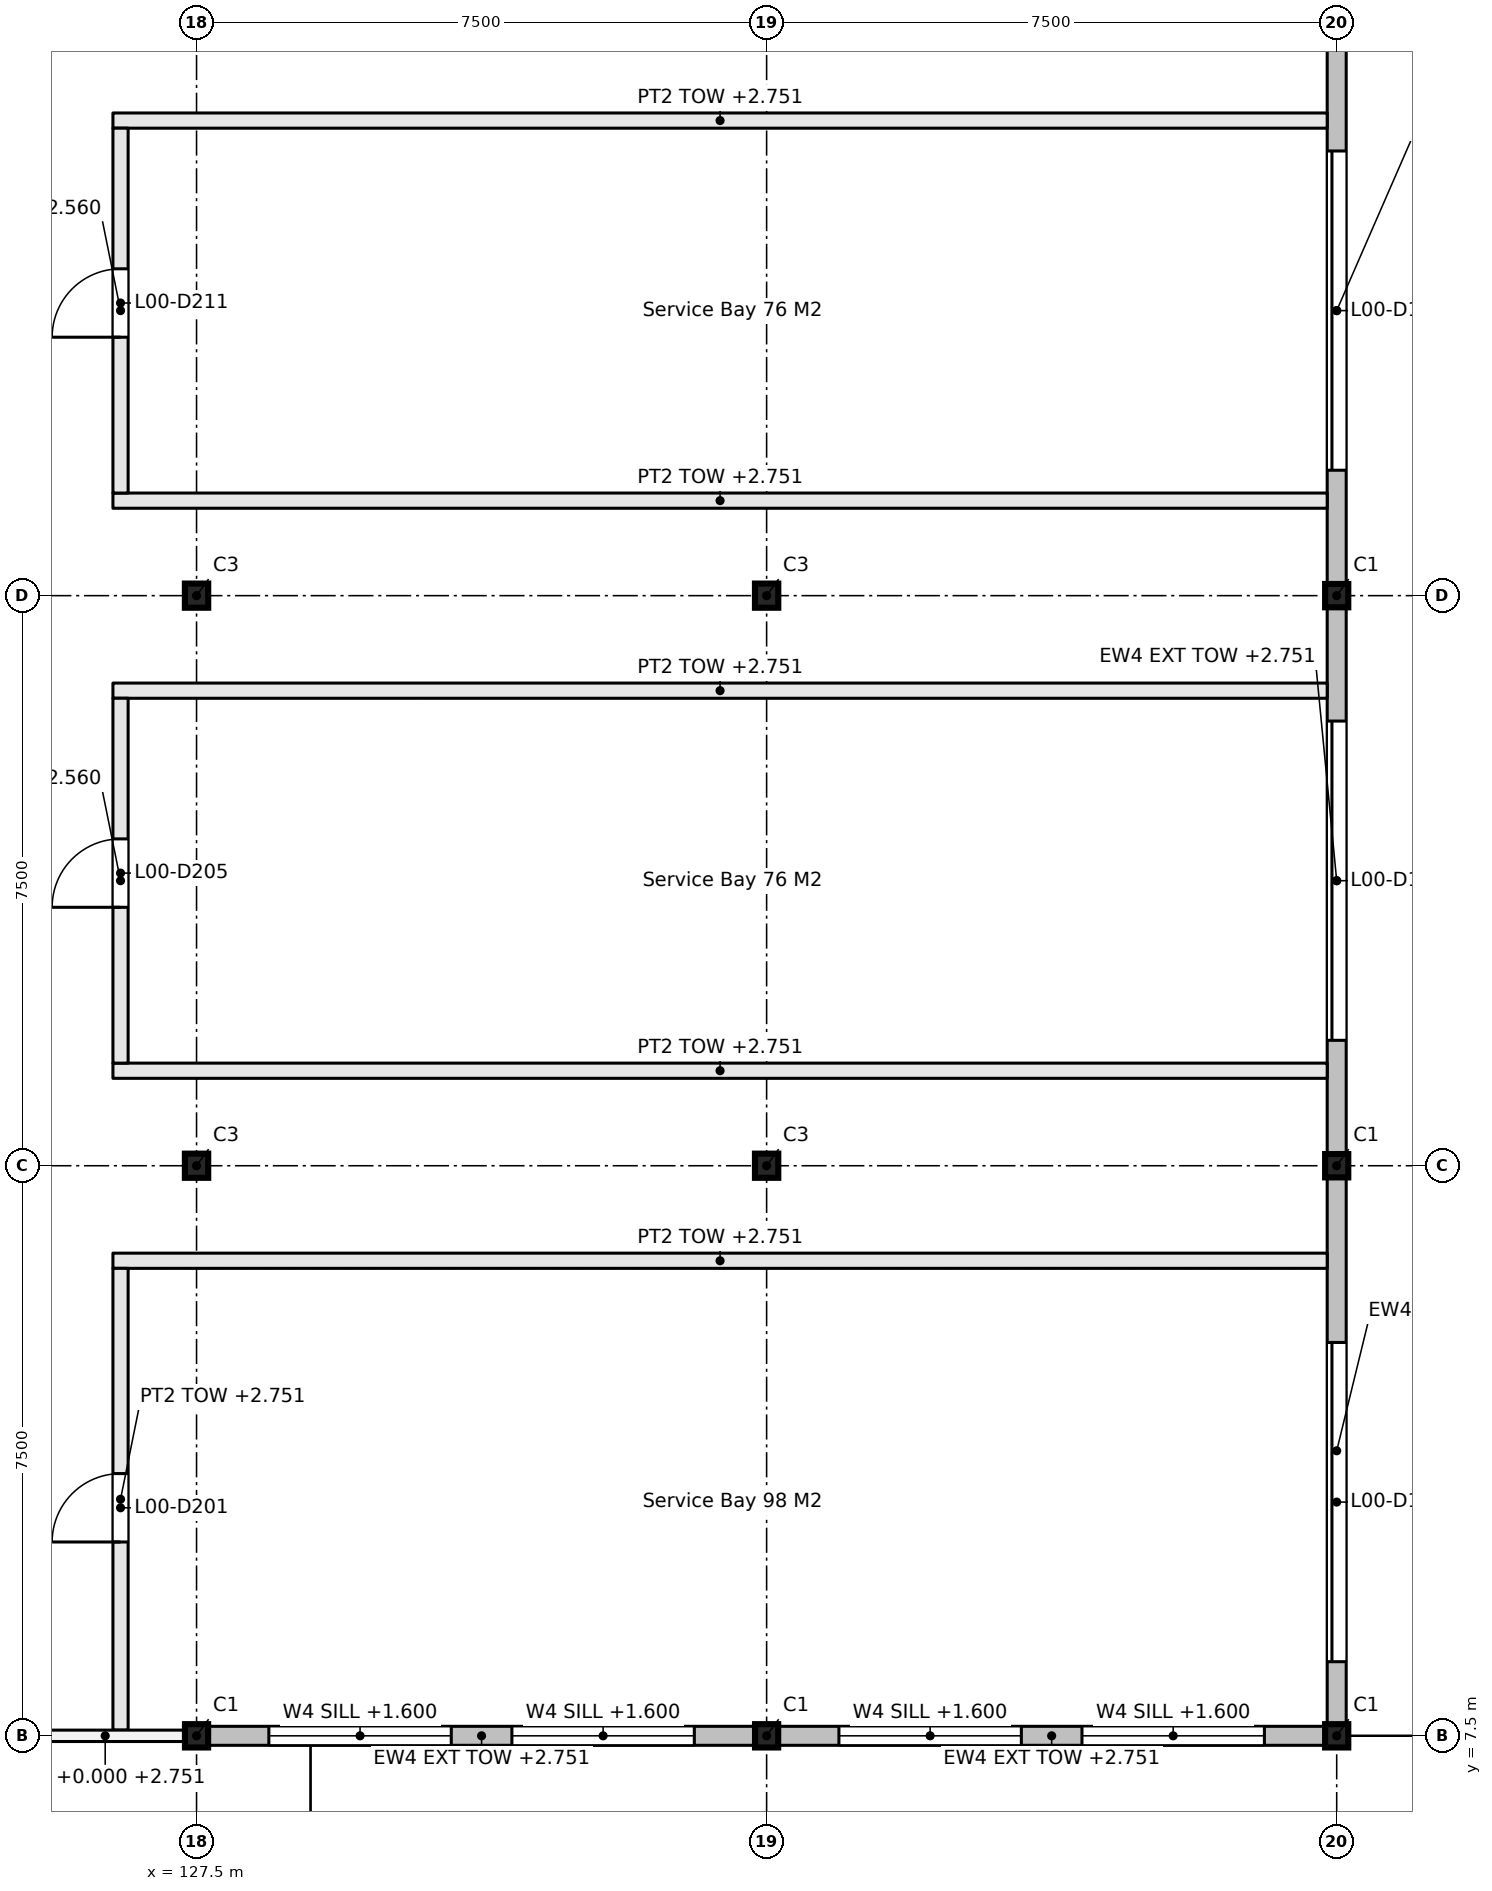
"""IFC4 building model, lengths in metres.
Left out: names, types, materials, properties, quantities, classifications, styles, units other than length and angle.
Written with IfcOpenShell. Run it as: python <this file> out.ifc"""

import sys

from ifc_helpers import new_model, si_unit, direction, frame, frame_2d, origin, origin_2d, place, context, subcontext, project, spatial, rectangle, i_section, extrude, element, fill, save


model = new_model("IFC4")
c1 = context("Model", 3, precision=1e-05, world=origin(), true_north=direction((0.0, 1.0)))
c2 = subcontext(c1, "Body", "Model", "MODEL_VIEW")
j1 = project(units=[si_unit("LENGTHUNIT", "METRE"), si_unit("PLANEANGLEUNIT", "RADIAN")], contexts=[c1])
p1 = place(None, origin())
s1 = spatial("IfcSite", under=j1, at=p1, CompositionType="ELEMENT")
p2 = place(p1, origin())
s2 = spatial("IfcBuilding", under=s1, at=p2, CompositionType="ELEMENT")
p3 = place(p2, origin())
s3 = spatial("IfcBuildingStorey", under=s2, at=p3, CompositionType="ELEMENT", Elevation=0.0)
p4 = place(p3, frame((127.5, 7.5, -0.25), z_axis=(0.0, 0.0, 1.0), x_axis=(1.0, 0.0, 0.0)))
e1 = element("IfcColumn", 1, at=p4, inside=s3, PredefinedType="COLUMN", context=c2, shape_type="SweptSolid", body=[
    extrude(i_section(OverallWidth=0.305, OverallDepth=0.307, WebThickness=0.01, FlangeThickness=0.015, FilletRadius=0.015, at=origin_2d()), origin(), (0.0, 0.0, 1.0), 3.55),
])
for number, where, z_axis, x_axis in (
    (2, (127.5, 15.0, -0.25), (0.0, 0.0, 1.0), (1.0, 0.0, 0.0)),
    (3, (127.5, 22.5, -0.25), (0.0, 0.0, 1.0), (1.0, 0.0, 0.0)),
):
    element("IfcColumn", number, at=place(p3, frame(where, z_axis=z_axis, x_axis=x_axis)), inside=s3, PredefinedType="COLUMN", context=c2, shape_type="SweptSolid", body=[
        extrude(i_section(OverallWidth=0.307, OverallDepth=0.318, WebThickness=0.013, FlangeThickness=0.021, FilletRadius=0.015, at=origin_2d()), origin(), (0.0, 0.0, 1.0), 3.55),
    ])
p5 = place(p3, frame((135.0, 7.5, -0.25), z_axis=(0.0, 0.0, 1.0), x_axis=(1.0, 0.0, 0.0)))
e4 = element("IfcColumn", 4, at=p5, inside=s3, PredefinedType="COLUMN", context=c2, shape_type="SweptSolid", body=[
    extrude(i_section(OverallWidth=0.305, OverallDepth=0.307, WebThickness=0.01, FlangeThickness=0.015, FilletRadius=0.015, at=origin_2d()), origin(), (0.0, 0.0, 1.0), 3.55),
])
for number, where, z_axis, x_axis in (
    (5, (135.0, 15.0, -0.25), (0.0, 0.0, 1.0), (1.0, 0.0, 0.0)),
    (6, (135.0, 22.5, -0.25), (0.0, 0.0, 1.0), (1.0, 0.0, 0.0)),
):
    element("IfcColumn", number, at=place(p3, frame(where, z_axis=z_axis, x_axis=x_axis)), inside=s3, PredefinedType="COLUMN", context=c2, shape_type="SweptSolid", body=[
        extrude(i_section(OverallWidth=0.307, OverallDepth=0.318, WebThickness=0.013, FlangeThickness=0.021, FilletRadius=0.015, at=origin_2d()), origin(), (0.0, 0.0, 1.0), 3.55),
    ])
for number, where, z_axis, x_axis in (
    (7, (142.5, 7.5, -0.25), (0.0, 0.0, 1.0), (1.0, 0.0, 0.0)),
    (8, (142.5, 15.0, -0.25), (0.0, 0.0, 1.0), (1.0, 0.0, 0.0)),
    (9, (142.5, 22.5, -0.25), (0.0, 0.0, 1.0), (1.0, 0.0, 0.0)),
):
    element("IfcColumn", number, at=place(p3, frame(where, z_axis=z_axis, x_axis=x_axis)), inside=s3, PredefinedType="COLUMN", context=c2, shape_type="SweptSolid", body=[
        extrude(i_section(OverallWidth=0.305, OverallDepth=0.307, WebThickness=0.01, FlangeThickness=0.015, FilletRadius=0.015, at=origin_2d()), origin(), (0.0, 0.0, 1.0), 3.55),
    ])
for number, where, z_axis, x_axis in (
    (10, (126.4, 13.75, 0.0), (0.0, 0.0, 1.0), (1.0, 0.0, 0.0)),
    (11, (126.4, 16.25, 0.0), (0.0, 0.0, 1.0), (1.0, 0.0, 0.0)),
    (12, (126.4, 21.25, 0.0), (0.0, 0.0, 1.0), (1.0, 0.0, 0.0)),
    (13, (126.4, 23.75, 0.0), (0.0, 0.0, 1.0), (1.0, 0.0, 0.0)),
    (14, (126.4, 28.75, 0.0), (0.0, 0.0, 1.0), (1.0, 0.0, 0.0)),
):
    element("IfcWall", number, at=place(p3, frame(where, z_axis=z_axis, x_axis=x_axis)), inside=s3, PredefinedType="PARTITIONING", context=c2, shape_type="SweptSolid", body=[
        extrude(rectangle(XDim=15.975, YDim=0.2, at=frame_2d((7.988, 0.0))), origin(), (0.0, 0.0, 1.0), 2.751),
    ])
p6 = place(p3, frame((126.5, 7.575, 0.0), z_axis=(0.0, 0.0, 1.0), x_axis=(0.0, 1.0, 0.0)))
e15 = element("IfcWall", 15, at=p6, inside=s3, PredefinedType="PARTITIONING", context=c2, shape_type="SweptSolid", body=[
    extrude(rectangle(XDim=6.075, YDim=0.2, at=frame_2d((3.038, 0.0))), origin(), (0.0, 0.0, 1.0), 2.751),
])
p7 = place(p6, frame((2.475, 0.0, 0.0)))
e16 = element("IfcOpeningElement", 16, at=p7, cuts=e15, PredefinedType="OPENING", context=c2, shape_type="SweptSolid", body=[
    extrude(rectangle(XDim=0.9, YDim=2.1, at=frame_2d((0.45, 1.05))), frame((0.0, 0.11, 0.0), z_axis=(0.0, -1.0, 0.0), x_axis=(1.0, 0.0, 0.0)), (0.0, 0.0, 1.0), 0.22),
])
p8 = place(p3, frame((126.5, 16.35, 0.0), z_axis=(0.0, 0.0, 1.0), x_axis=(0.0, 1.0, 0.0)))
e17 = element("IfcWall", 17, at=p8, inside=s3, PredefinedType="PARTITIONING", context=c2, shape_type="SweptSolid", body=[
    extrude(rectangle(XDim=4.8, YDim=0.2, at=frame_2d((2.4, 0.0))), origin(), (0.0, 0.0, 1.0), 2.56),
])
p9 = place(p8, frame((2.05, 0.0, 0.0)))
e18 = element("IfcOpeningElement", 18, at=p9, cuts=e17, PredefinedType="OPENING", context=c2, shape_type="SweptSolid", body=[
    extrude(rectangle(XDim=0.9, YDim=2.1, at=frame_2d((0.45, 1.05))), frame((0.0, 0.11, 0.0), z_axis=(0.0, -1.0, 0.0), x_axis=(1.0, 0.0, 0.0)), (0.0, 0.0, 1.0), 0.22),
])
p10 = place(p3, frame((126.5, 23.85, 0.0), z_axis=(0.0, 0.0, 1.0), x_axis=(0.0, 1.0, 0.0)))
e19 = element("IfcWall", 19, at=p10, inside=s3, PredefinedType="PARTITIONING", context=c2, shape_type="SweptSolid", body=[
    extrude(rectangle(XDim=4.8, YDim=0.2, at=frame_2d((2.4, 0.0))), origin(), (0.0, 0.0, 1.0), 2.56),
])
p11 = place(p10, frame((2.05, 0.0, 0.0)))
e20 = element("IfcOpeningElement", 20, at=p11, cuts=e19, PredefinedType="OPENING", context=c2, shape_type="SweptSolid", body=[
    extrude(rectangle(XDim=0.9, YDim=2.1, at=frame_2d((0.45, 1.05))), frame((0.0, 0.11, 0.0), z_axis=(0.0, -1.0, 0.0), x_axis=(1.0, 0.0, 0.0)), (0.0, 0.0, 1.0), 0.22),
])
p12 = place(p3, frame((127.654, 7.5, 0.0), z_axis=(0.0, 0.0, 1.0), x_axis=(1.0, 0.0, 0.0)))
e21 = element("IfcWall", 21, at=p12, inside=s3, PredefinedType="SOLIDWALL", context=c2, shape_type="SweptSolid", body=[
    extrude(rectangle(XDim=7.193, YDim=0.25, at=frame_2d((3.596, 0.0))), origin(), (0.0, 0.0, 1.0), 2.751),
])
p13 = place(p12, frame((0.798, 0.0, 1.6)))
e22 = element("IfcOpeningElement", 22, at=p13, cuts=e21, PredefinedType="OPENING", context=c2, shape_type="SweptSolid", body=[
    extrude(rectangle(XDim=2.4, YDim=0.9, at=frame_2d((1.2, 0.45))), frame((0.0, 0.135, 0.0), z_axis=(0.0, -1.0, 0.0), x_axis=(1.0, 0.0, 0.0)), (0.0, 0.0, 1.0), 0.27),
])
p14 = place(p12, frame((3.995, 0.0, 1.6)))
e23 = element("IfcOpeningElement", 23, at=p14, cuts=e21, PredefinedType="OPENING", context=c2, shape_type="SweptSolid", body=[
    extrude(rectangle(XDim=2.4, YDim=0.9, at=frame_2d((1.2, 0.45))), frame((0.0, 0.135, 0.0), z_axis=(0.0, -1.0, 0.0), x_axis=(1.0, 0.0, 0.0)), (0.0, 0.0, 1.0), 0.27),
])
p15 = place(p3, frame((135.154, 7.5, 0.0), z_axis=(0.0, 0.0, 1.0), x_axis=(1.0, 0.0, 0.0)))
e24 = element("IfcWall", 24, at=p15, inside=s3, PredefinedType="SOLIDWALL", context=c2, shape_type="SweptSolid", body=[
    extrude(rectangle(XDim=7.193, YDim=0.25, at=frame_2d((3.596, 0.0))), origin(), (0.0, 0.0, 1.0), 2.751),
])
p16 = place(p15, frame((0.798, 0.0, 1.6)))
e25 = element("IfcOpeningElement", 25, at=p16, cuts=e24, PredefinedType="OPENING", context=c2, shape_type="SweptSolid", body=[
    extrude(rectangle(XDim=2.4, YDim=0.9, at=frame_2d((1.2, 0.45))), frame((0.0, 0.135, 0.0), z_axis=(0.0, -1.0, 0.0), x_axis=(1.0, 0.0, 0.0)), (0.0, 0.0, 1.0), 0.27),
])
p17 = place(p15, frame((3.995, 0.0, 1.6)))
e26 = element("IfcOpeningElement", 26, at=p17, cuts=e24, PredefinedType="OPENING", context=c2, shape_type="SweptSolid", body=[
    extrude(rectangle(XDim=2.4, YDim=0.9, at=frame_2d((1.2, 0.45))), frame((0.0, 0.135, 0.0), z_axis=(0.0, -1.0, 0.0), x_axis=(1.0, 0.0, 0.0)), (0.0, 0.0, 1.0), 0.27),
])
p18 = place(p3, frame((142.5, 7.654, 0.0), z_axis=(0.0, 0.0, 1.0), x_axis=(0.0, 1.0, 0.0)))
e27 = element("IfcWall", 27, at=p18, inside=s3, PredefinedType="SOLIDWALL", context=c2, shape_type="SweptSolid", body=[
    extrude(rectangle(XDim=7.193, YDim=0.25, at=frame_2d((3.596, 0.0))), origin(), (0.0, 0.0, 1.0), 2.751),
])
p19 = place(p18, frame((0.822, 0.0, 0.0)))
e28 = element("IfcOpeningElement", 28, at=p19, cuts=e27, PredefinedType="OPENING", context=c2, shape_type="SweptSolid", body=[
    extrude(rectangle(XDim=4.2, YDim=2.5, at=frame_2d((2.1, 1.25))), frame((0.0, 0.135, 0.0), z_axis=(0.0, -1.0, 0.0), x_axis=(1.0, 0.0, 0.0)), (0.0, 0.0, 1.0), 0.27),
])
p20 = place(p3, frame((142.5, 15.154, 0.0), z_axis=(0.0, 0.0, 1.0), x_axis=(0.0, 1.0, 0.0)))
e29 = element("IfcWall", 29, at=p20, inside=s3, PredefinedType="SOLIDWALL", context=c2, shape_type="SweptSolid", body=[
    extrude(rectangle(XDim=7.193, YDim=0.25, at=frame_2d((3.596, 0.0))), origin(), (0.0, 0.0, 1.0), 2.751),
])
p21 = place(p20, frame((1.497, 0.0, 0.0)))
e30 = element("IfcOpeningElement", 30, at=p21, cuts=e29, PredefinedType="OPENING", context=c2, shape_type="SweptSolid", body=[
    extrude(rectangle(XDim=4.2, YDim=2.5, at=frame_2d((2.1, 1.25))), frame((0.0, 0.135, 0.0), z_axis=(0.0, -1.0, 0.0), x_axis=(1.0, 0.0, 0.0)), (0.0, 0.0, 1.0), 0.27),
])
p22 = place(p3, frame((142.5, 22.654, 0.0), z_axis=(0.0, 0.0, 1.0), x_axis=(0.0, 1.0, 0.0)))
e31 = element("IfcWall", 31, at=p22, inside=s3, PredefinedType="SOLIDWALL", context=c2, shape_type="SweptSolid", body=[
    extrude(rectangle(XDim=7.193, YDim=0.25, at=frame_2d((3.596, 0.0))), origin(), (0.0, 0.0, 1.0), 2.751),
])
p23 = place(p22, frame((1.497, 0.0, 0.0)))
e32 = element("IfcOpeningElement", 32, at=p23, cuts=e31, PredefinedType="OPENING", context=c2, shape_type="SweptSolid", body=[
    extrude(rectangle(XDim=4.2, YDim=2.5, at=frame_2d((2.1, 1.25))), frame((0.0, 0.135, 0.0), z_axis=(0.0, -1.0, 0.0), x_axis=(1.0, 0.0, 0.0)), (0.0, 0.0, 1.0), 0.27),
])
p24 = place(p7, origin())
e33 = element("IfcDoor", 33, at=p24, inside=s3, OperationType="SINGLE_SWING_LEFT", PredefinedType="DOOR", context=c2, shape_type="SweptSolid", body=[
    extrude(rectangle(XDim=0.9, YDim=2.1, at=frame_2d((0.45, 1.05))), frame((0.0, 0.025, 0.0), z_axis=(0.0, -1.0, 0.0), x_axis=(1.0, 0.0, 0.0)), (0.0, 0.0, 1.0), 0.05),
])
fill(e16, e33)
p25 = place(p9, origin())
e34 = element("IfcDoor", 34, at=p25, inside=s3, OperationType="SINGLE_SWING_RIGHT", PredefinedType="DOOR", context=c2, shape_type="SweptSolid", body=[
    extrude(rectangle(XDim=0.9, YDim=2.1, at=frame_2d((0.45, 1.05))), frame((0.0, 0.025, 0.0), z_axis=(0.0, -1.0, 0.0), x_axis=(1.0, 0.0, 0.0)), (0.0, 0.0, 1.0), 0.05),
])
fill(e18, e34)
p26 = place(p11, origin())
e35 = element("IfcDoor", 35, at=p26, inside=s3, OperationType="SINGLE_SWING_RIGHT", PredefinedType="DOOR", context=c2, shape_type="SweptSolid", body=[
    extrude(rectangle(XDim=0.9, YDim=2.1, at=frame_2d((0.45, 1.05))), frame((0.0, 0.025, 0.0), z_axis=(0.0, -1.0, 0.0), x_axis=(1.0, 0.0, 0.0)), (0.0, 0.0, 1.0), 0.05),
])
fill(e20, e35)
p27 = place(p13, origin())
e36 = element("IfcWindow", 36, at=p27, inside=s3, PartitioningType="DOUBLE_PANEL_VERTICAL", PredefinedType="WINDOW", context=c2, shape_type="SweptSolid", body=[
    extrude(rectangle(XDim=2.4, YDim=0.9, at=frame_2d((1.2, 0.45))), frame((0.0, 0.03, 0.0), z_axis=(0.0, -1.0, 0.0), x_axis=(1.0, 0.0, 0.0)), (0.0, 0.0, 1.0), 0.06),
])
fill(e22, e36)
p28 = place(p14, origin())
e37 = element("IfcWindow", 37, at=p28, inside=s3, PartitioningType="DOUBLE_PANEL_VERTICAL", PredefinedType="WINDOW", context=c2, shape_type="SweptSolid", body=[
    extrude(rectangle(XDim=2.4, YDim=0.9, at=frame_2d((1.2, 0.45))), frame((0.0, 0.03, 0.0), z_axis=(0.0, -1.0, 0.0), x_axis=(1.0, 0.0, 0.0)), (0.0, 0.0, 1.0), 0.06),
])
fill(e23, e37)
p29 = place(p16, origin())
e38 = element("IfcWindow", 38, at=p29, inside=s3, PartitioningType="DOUBLE_PANEL_VERTICAL", PredefinedType="WINDOW", context=c2, shape_type="SweptSolid", body=[
    extrude(rectangle(XDim=2.4, YDim=0.9, at=frame_2d((1.2, 0.45))), frame((0.0, 0.03, 0.0), z_axis=(0.0, -1.0, 0.0), x_axis=(1.0, 0.0, 0.0)), (0.0, 0.0, 1.0), 0.06),
])
fill(e25, e38)
p30 = place(p17, origin())
e39 = element("IfcWindow", 39, at=p30, inside=s3, PartitioningType="DOUBLE_PANEL_VERTICAL", PredefinedType="WINDOW", context=c2, shape_type="SweptSolid", body=[
    extrude(rectangle(XDim=2.4, YDim=0.9, at=frame_2d((1.2, 0.45))), frame((0.0, 0.03, 0.0), z_axis=(0.0, -1.0, 0.0), x_axis=(1.0, 0.0, 0.0)), (0.0, 0.0, 1.0), 0.06),
])
fill(e26, e39)
p31 = place(p19, origin())
e40 = element("IfcDoor", 40, at=p31, inside=s3, OperationType="ROLLINGUP", PredefinedType="DOOR", context=c2, shape_type="SweptSolid", body=[
    extrude(rectangle(XDim=4.2, YDim=2.5, at=frame_2d((2.1, 1.25))), frame((0.0, 0.025, 0.0), z_axis=(0.0, -1.0, 0.0), x_axis=(1.0, 0.0, 0.0)), (0.0, 0.0, 1.0), 0.05),
])
fill(e28, e40)
p32 = place(p21, origin())
e41 = element("IfcDoor", 41, at=p32, inside=s3, OperationType="ROLLINGUP", PredefinedType="DOOR", context=c2, shape_type="SweptSolid", body=[
    extrude(rectangle(XDim=4.2, YDim=2.5, at=frame_2d((2.1, 1.25))), frame((0.0, 0.025, 0.0), z_axis=(0.0, -1.0, 0.0), x_axis=(1.0, 0.0, 0.0)), (0.0, 0.0, 1.0), 0.05),
])
fill(e30, e41)
p33 = place(p23, origin())
e42 = element("IfcDoor", 42, at=p33, inside=s3, OperationType="ROLLINGUP", PredefinedType="DOOR", context=c2, shape_type="SweptSolid", body=[
    extrude(rectangle(XDim=4.2, YDim=2.5, at=frame_2d((2.1, 1.25))), frame((0.0, 0.025, 0.0), z_axis=(0.0, -1.0, 0.0), x_axis=(1.0, 0.0, 0.0)), (0.0, 0.0, 1.0), 0.05),
])
fill(e32, e42)
save(model, sys.argv[1])
